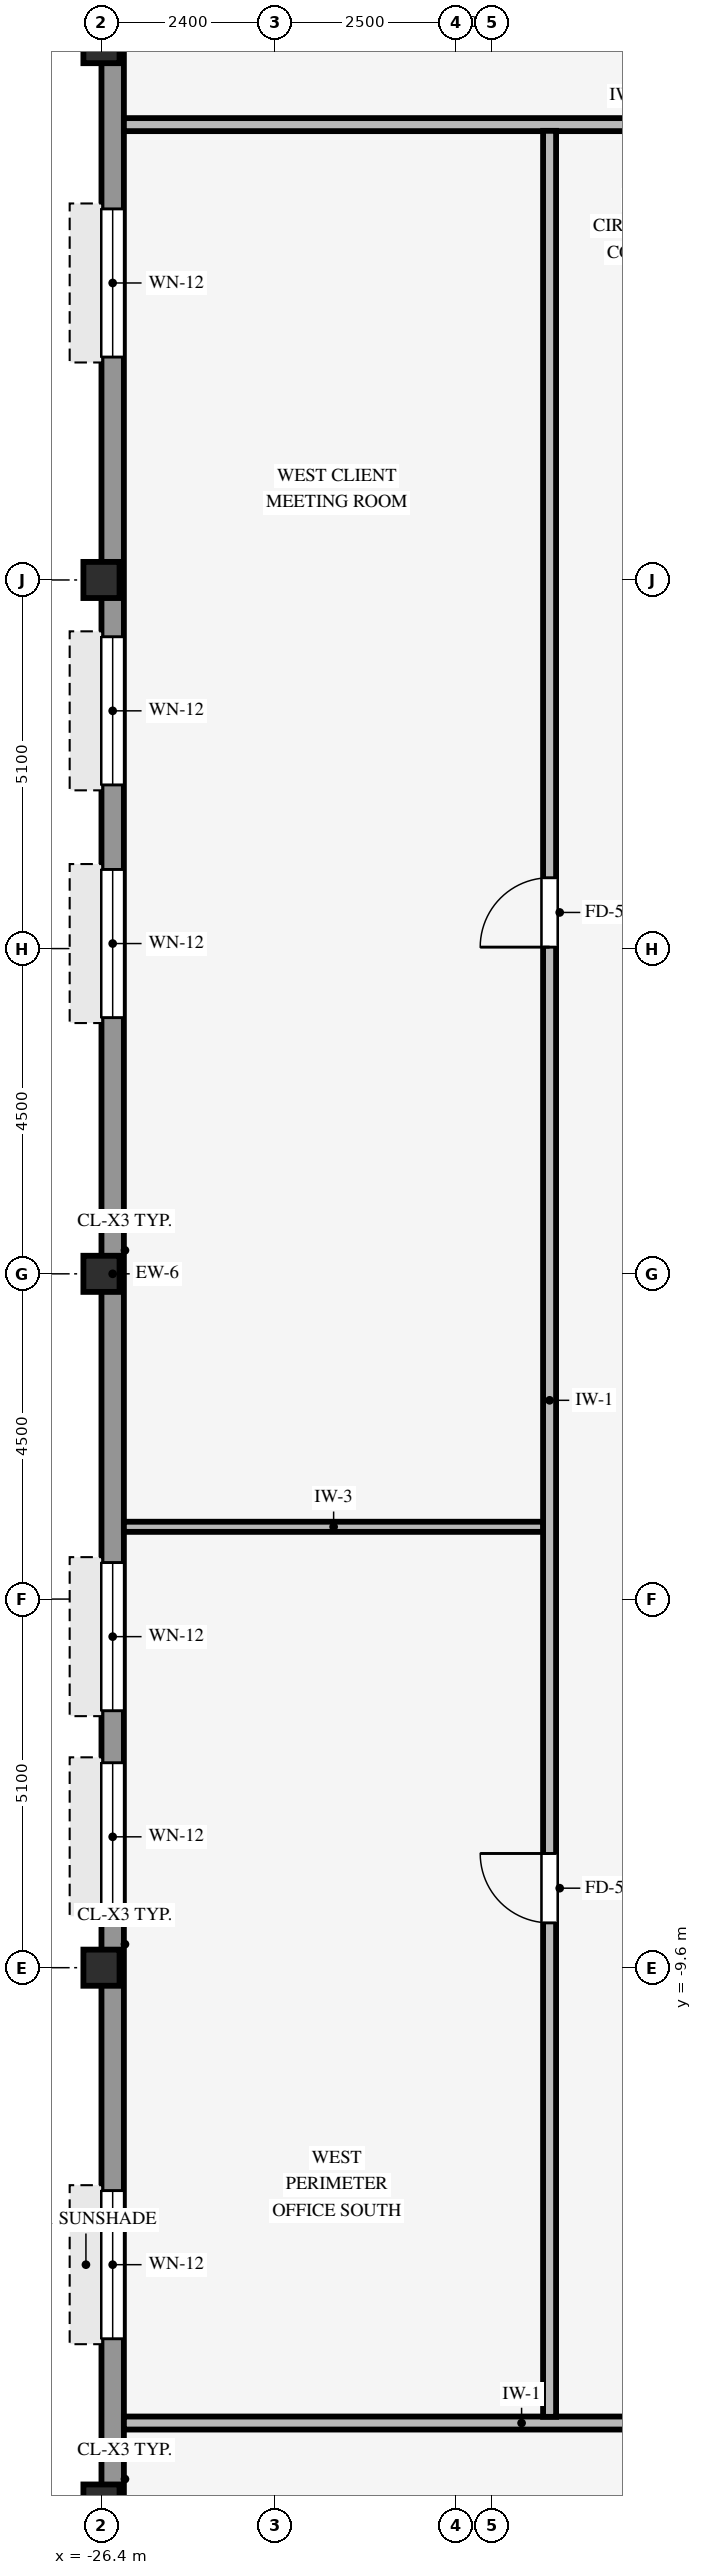
"""IFC4 building model, lengths in metres.
Left out: names, types, materials, properties, quantities, classifications, styles, units other than length and angle.
Written with IfcOpenShell. Run it as: python <this file> out.ifc"""

import sys

from ifc_helpers import new_model, si_unit, direction, frame, frame_2d, origin, origin_2d, place, context, subcontext, project, spatial, rectangle, hollow_rectangle, extrude, source, transform, mapped, element, fill, save


model = new_model("IFC4")
c1 = context("Model", 3, precision=1e-05, world=origin(), true_north=direction((0.0, 1.0)))
c2 = subcontext(c1, "Body", "Model", "MODEL_VIEW")
j1 = project(units=[si_unit("LENGTHUNIT", "METRE"), si_unit("PLANEANGLEUNIT", "RADIAN")], contexts=[c1])
p1 = place(None, origin())
s1 = spatial("IfcSite", under=j1, at=p1, CompositionType="ELEMENT")
p2 = place(p1, origin())
s2 = spatial("IfcBuilding", under=s1, at=p2, CompositionType="ELEMENT")
p3 = place(p2, frame((0.0, 0.0, 216.45)))
s3 = spatial("IfcBuildingStorey", under=s2, at=p3, CompositionType="ELEMENT", Elevation=216.45)
for number, where, z_axis, x_axis in (
    (1, (-26.4, -17.0, 0.0), (0.0, 0.0, 1.0), (1.0, 0.0, 0.0)),
    (2, (-26.4, -9.6, 0.0), (0.0, 0.0, 1.0), (1.0, 0.0, 0.0)),
    (3, (-26.4, 0.0, 0.0), (0.0, 0.0, 1.0), (1.0, 0.0, 0.0)),
    (4, (-26.4, 9.6, 0.0), (0.0, 0.0, 1.0), (1.0, 0.0, 0.0)),
    (5, (-26.4, 17.0, 0.0), (0.0, 0.0, 1.0), (1.0, 0.0, 0.0)),
):
    element("IfcColumn", number, at=place(p3, frame(where, z_axis=z_axis, x_axis=x_axis)), inside=s3, PredefinedType="COLUMN", context=c2, shape_type="SweptSolid", body=[
        extrude(hollow_rectangle(XDim=0.5, YDim=0.5, WallThickness=0.032, InnerFilletRadius=0.032, OuterFilletRadius=0.064, at=origin_2d()), origin(), (0.0, 0.0, 1.0), 3.37),
    ])
p4 = place(p3, frame((-26.245, -16.994, 0.0), z_axis=(0.0, 0.0, 1.0), x_axis=(0.0, 1.0, 0.0)))
e6 = element("IfcWall", 6, at=p4, inside=s3, PredefinedType="STANDARD", context=c2, shape_type="SweptSolid", body=[
    extrude(rectangle(XDim=33.988, YDim=0.31, at=frame_2d((16.994, 0.0))), origin(), (0.0, 0.0, 1.0), 2.705),
])
p5 = place(p4, frame((2.26, 0.0, 0.8)))
e7 = element("IfcOpeningElement", 7, at=p5, cuts=e6, PredefinedType="OPENING", context=c2, shape_type="SweptSolid", body=[
    extrude(rectangle(XDim=2.05, YDim=1.52, at=frame_2d((1.025, 0.76))), frame((0.0, 0.165, 0.0), z_axis=(0.0, -1.0, 0.0), x_axis=(1.0, 0.0, 0.0)), (0.0, 0.0, 1.0), 0.33),
])
p6 = place(p4, frame((8.18, 0.0, 0.8)))
e8 = element("IfcOpeningElement", 8, at=p6, cuts=e6, PredefinedType="OPENING", context=c2, shape_type="SweptSolid", body=[
    extrude(rectangle(XDim=2.05, YDim=1.52, at=frame_2d((1.025, 0.76))), frame((0.0, 0.165, 0.0), z_axis=(0.0, -1.0, 0.0), x_axis=(1.0, 0.0, 0.0)), (0.0, 0.0, 1.0), 0.33),
])
p7 = place(p4, frame((10.949, 0.0, 0.8)))
e9 = element("IfcOpeningElement", 9, at=p7, cuts=e6, PredefinedType="OPENING", context=c2, shape_type="SweptSolid", body=[
    extrude(rectangle(XDim=2.05, YDim=1.52, at=frame_2d((1.025, 0.76))), frame((0.0, 0.165, 0.0), z_axis=(0.0, -1.0, 0.0), x_axis=(1.0, 0.0, 0.0)), (0.0, 0.0, 1.0), 0.33),
])
p8 = place(p4, frame((20.539, 0.0, 0.8)))
e10 = element("IfcOpeningElement", 10, at=p8, cuts=e6, PredefinedType="OPENING", context=c2, shape_type="SweptSolid", body=[
    extrude(rectangle(XDim=2.05, YDim=1.52, at=frame_2d((1.025, 0.76))), frame((0.0, 0.165, 0.0), z_axis=(0.0, -1.0, 0.0), x_axis=(1.0, 0.0, 0.0)), (0.0, 0.0, 1.0), 0.33),
])
p9 = place(p4, frame((23.758, 0.0, 0.8)))
e11 = element("IfcOpeningElement", 11, at=p9, cuts=e6, PredefinedType="OPENING", context=c2, shape_type="SweptSolid", body=[
    extrude(rectangle(XDim=2.05, YDim=1.52, at=frame_2d((1.025, 0.76))), frame((0.0, 0.165, 0.0), z_axis=(0.0, -1.0, 0.0), x_axis=(1.0, 0.0, 0.0)), (0.0, 0.0, 1.0), 0.33),
])
p10 = place(p4, frame((29.678, 0.0, 0.8)))
e12 = element("IfcOpeningElement", 12, at=p10, cuts=e6, PredefinedType="OPENING", context=c2, shape_type="SweptSolid", body=[
    extrude(rectangle(XDim=2.05, YDim=1.52, at=frame_2d((1.025, 0.76))), frame((0.0, 0.165, 0.0), z_axis=(0.0, -1.0, 0.0), x_axis=(1.0, 0.0, 0.0)), (0.0, 0.0, 1.0), 0.33),
])
p11 = place(p3, frame((-26.09, -15.9, 0.0), z_axis=(0.0, 0.0, 1.0), x_axis=(1.0, 0.0, 0.0)))
e13 = element("IfcWall", 13, at=p11, inside=s3, PredefinedType="PARTITIONING", context=c2, shape_type="SweptSolid", body=[
    extrude(rectangle(XDim=35.09, YDim=0.18, at=frame_2d((17.545, 0.0))), origin(), (0.0, 0.0, 1.0), 3.36),
])
p12 = place(p11, frame((23.605, 0.0, 0.0)))
e14 = element("IfcOpeningElement", 14, at=p12, cuts=e13, PredefinedType="OPENING", context=c2, shape_type="SweptSolid", body=[
    extrude(rectangle(XDim=0.96, YDim=2.1, at=frame_2d((0.48, 1.05))), frame((0.0, 0.1, 0.0), z_axis=(0.0, -1.0, 0.0), x_axis=(1.0, 0.0, 0.0)), (0.0, 0.0, 1.0), 0.2),
])
p13 = place(p11, frame((11.455, 0.0, 0.0)))
e15 = element("IfcOpeningElement", 15, at=p13, cuts=e13, PredefinedType="OPENING", context=c2, shape_type="SweptSolid", body=[
    extrude(rectangle(XDim=0.96, YDim=2.1, at=frame_2d((0.48, 1.05))), frame((0.0, 0.1, 0.0), z_axis=(0.0, -1.0, 0.0), x_axis=(1.0, 0.0, 0.0)), (0.0, 0.0, 1.0), 0.2),
])
p14 = place(p3, frame((-26.09, -3.5, 0.0), z_axis=(0.0, 0.0, 1.0), x_axis=(1.0, 0.0, 0.0)))
e16 = element("IfcWall", 16, at=p14, inside=s3, PredefinedType="PARTITIONING", context=c2, shape_type="SweptSolid", body=[
    extrude(rectangle(XDim=5.804, YDim=0.14, at=frame_2d((2.902, 0.0))), origin(), (0.0, 0.0, 1.0), 3.36),
])
p15 = place(p3, frame((-26.09, 15.9, 0.0), z_axis=(0.0, 0.0, 1.0), x_axis=(1.0, 0.0, 0.0)))
e17 = element("IfcWall", 17, at=p15, inside=s3, PredefinedType="PARTITIONING", context=c2, shape_type="SweptSolid", body=[
    extrude(rectangle(XDim=35.09, YDim=0.18, at=frame_2d((17.545, 0.0))), origin(), (0.0, 0.0, 1.0), 3.36),
])
p16 = place(p15, frame((14.415, 0.0, 0.0)))
e18 = element("IfcOpeningElement", 18, at=p16, cuts=e17, PredefinedType="OPENING", context=c2, shape_type="SweptSolid", body=[
    extrude(rectangle(XDim=0.96, YDim=2.1, at=frame_2d((0.48, 1.05))), frame((0.0, 0.1, 0.0), z_axis=(0.0, -1.0, 0.0), x_axis=(1.0, 0.0, 0.0)), (0.0, 0.0, 1.0), 0.2),
])
p17 = place(p15, frame((26.565, 0.0, 0.0)))
e19 = element("IfcOpeningElement", 19, at=p17, cuts=e17, PredefinedType="OPENING", context=c2, shape_type="SweptSolid", body=[
    extrude(rectangle(XDim=0.96, YDim=2.1, at=frame_2d((0.48, 1.05))), frame((0.0, 0.1, 0.0), z_axis=(0.0, -1.0, 0.0), x_axis=(1.0, 0.0, 0.0)), (0.0, 0.0, 1.0), 0.2),
])
p18 = place(p3, frame((-20.2, -15.814, 0.0), z_axis=(0.0, 0.0, 1.0), x_axis=(0.0, 1.0, 0.0)))
e20 = element("IfcWall", 20, at=p18, inside=s3, PredefinedType="PARTITIONING", context=c2, shape_type="SweptSolid", body=[
    extrude(rectangle(XDim=31.628, YDim=0.18, at=frame_2d((15.814, 0.0))), origin(), (0.0, 0.0, 1.0), 3.36),
])
p19 = place(p18, frame((20.334, 0.0, 0.0)))
e21 = element("IfcOpeningElement", 21, at=p19, cuts=e20, PredefinedType="OPENING", context=c2, shape_type="SweptSolid", body=[
    extrude(rectangle(XDim=0.96, YDim=2.1, at=frame_2d((0.48, 1.05))), frame((0.0, 0.1, 0.0), z_axis=(0.0, -1.0, 0.0), x_axis=(1.0, 0.0, 0.0)), (0.0, 0.0, 1.0), 0.2),
])
p20 = place(p18, frame((6.834, 0.0, 0.0)))
e22 = element("IfcOpeningElement", 22, at=p20, cuts=e20, PredefinedType="OPENING", context=c2, shape_type="SweptSolid", body=[
    extrude(rectangle(XDim=0.96, YDim=2.1, at=frame_2d((0.48, 1.05))), frame((0.0, 0.1, 0.0), z_axis=(0.0, -1.0, 0.0), x_axis=(1.0, 0.0, 0.0)), (0.0, 0.0, 1.0), 0.2),
])
m1 = source(origin(), c2, "Body", "SweptSolid", [
    extrude(rectangle(XDim=2.05, YDim=1.52, at=frame_2d((1.025, 0.76))), frame((0.0, 0.03, 0.0), z_axis=(0.0, -1.0, 0.0), x_axis=(1.0, 0.0, 0.0)), (0.0, 0.0, 1.0), 0.06),
])
p21 = place(p5, origin())
e23 = element("IfcWindow", 23, at=p21, inside=s3, PartitioningType="SINGLE_PANEL", PredefinedType="WINDOW", context=c2, shape_type="MappedRepresentation", body=[
    mapped(m1, transform((0.0, 0.0, 0.0), scale=1.0)),
])
fill(e7, e23)
p22 = place(p6, origin())
e24 = element("IfcWindow", 24, at=p22, inside=s3, PartitioningType="SINGLE_PANEL", PredefinedType="WINDOW", context=c2, shape_type="MappedRepresentation", body=[
    mapped(m1, transform((0.0, 0.0, 0.0), scale=1.0)),
])
fill(e8, e24)
p23 = place(p7, origin())
e25 = element("IfcWindow", 25, at=p23, inside=s3, PartitioningType="SINGLE_PANEL", PredefinedType="WINDOW", context=c2, shape_type="MappedRepresentation", body=[
    mapped(m1, transform((0.0, 0.0, 0.0), scale=1.0)),
])
fill(e9, e25)
p24 = place(p8, origin())
e26 = element("IfcWindow", 26, at=p24, inside=s3, PartitioningType="SINGLE_PANEL", PredefinedType="WINDOW", context=c2, shape_type="MappedRepresentation", body=[
    mapped(m1, transform((0.0, 0.0, 0.0), scale=1.0)),
])
fill(e10, e26)
p25 = place(p9, origin())
e27 = element("IfcWindow", 27, at=p25, inside=s3, PartitioningType="SINGLE_PANEL", PredefinedType="WINDOW", context=c2, shape_type="MappedRepresentation", body=[
    mapped(m1, transform((0.0, 0.0, 0.0), scale=1.0)),
])
fill(e11, e27)
p26 = place(p10, origin())
e28 = element("IfcWindow", 28, at=p26, inside=s3, PartitioningType="SINGLE_PANEL", PredefinedType="WINDOW", context=c2, shape_type="MappedRepresentation", body=[
    mapped(m1, transform((0.0, 0.0, 0.0), scale=1.0)),
])
fill(e12, e28)
m2 = source(origin(), c2, "Body", "SweptSolid", [
    extrude(rectangle(XDim=0.96, YDim=2.1, at=frame_2d((0.48, 1.05))), frame((0.0, 0.025, 0.0), z_axis=(0.0, -1.0, 0.0), x_axis=(1.0, 0.0, 0.0)), (0.0, 0.0, 1.0), 0.05),
])
p27 = place(p19, origin())
e29 = element("IfcDoor", 29, at=p27, inside=s3, OperationType="SINGLE_SWING_LEFT", PredefinedType="DOOR", context=c2, shape_type="MappedRepresentation", body=[
    mapped(m2, transform((0.0, 0.0, 0.0), scale=1.0)),
])
fill(e21, e29)
p28 = place(p20, origin())
e30 = element("IfcDoor", 30, at=p28, inside=s3, OperationType="SINGLE_SWING_RIGHT", PredefinedType="DOOR", context=c2, shape_type="MappedRepresentation", body=[
    mapped(m2, transform((0.0, 0.0, 0.0), scale=1.0)),
])
fill(e22, e30)
save(model, sys.argv[1])
